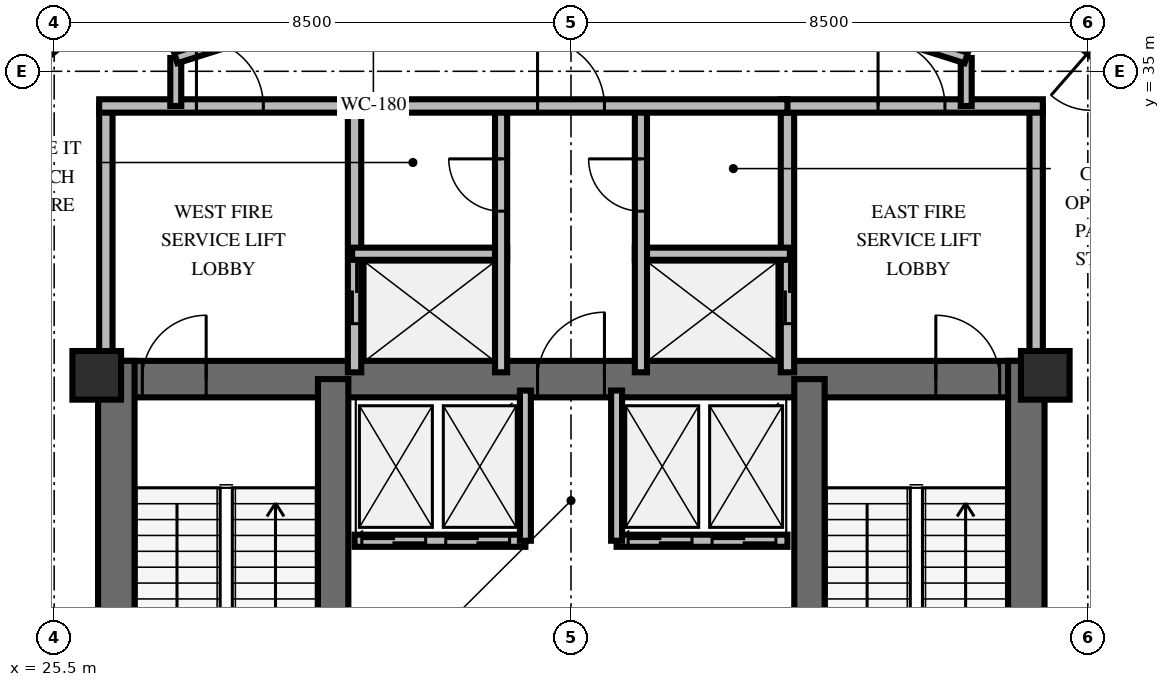
"""IFC4 building model, lengths in metres.
Left out: names, types, materials, properties, quantities, classifications, styles, units other than length and angle.
Written with IfcOpenShell. Run it as: python <this file> out.ifc"""

import sys

from ifc_helpers import new_model, si_unit, direction, frame, frame_2d, origin, origin_2d, place, context, subcontext, project, spatial, rectangle, extrude, element, fill, save


model = new_model("IFC4")
c1 = context("Model", 3, precision=1e-05, world=origin(), true_north=direction((0.0, 1.0)))
c2 = subcontext(c1, "Body", "Model", "MODEL_VIEW")
j1 = project(units=[si_unit("LENGTHUNIT", "METRE"), si_unit("PLANEANGLEUNIT", "RADIAN")], contexts=[c1])
p1 = place(None, origin())
s1 = spatial("IfcSite", under=j1, at=p1, CompositionType="ELEMENT")
p2 = place(p1, origin())
s2 = spatial("IfcBuilding", under=s1, at=p2, CompositionType="ELEMENT")
p3 = place(p2, frame((0.0, 0.0, 273.6)))
s3 = spatial("IfcBuildingStorey", under=s2, at=p3, CompositionType="ELEMENT", Elevation=273.6)
p4 = place(p3, frame((26.222, 29.938, 0.0), z_axis=(0.0, 0.0, 1.0), x_axis=(1.0, 0.0, 0.0)))
e1 = element("IfcWall", 1, at=p4, inside=s3, PredefinedType="SHEAR", context=c2, shape_type="SweptSolid", body=[
    extrude(rectangle(XDim=15.566, YDim=0.6, at=frame_2d((7.783, 0.0))), origin(), (0.0, 0.0, 1.0), 3.6),
])
p5 = place(p4, frame((0.728, 0.0, 0.0)))
e2 = element("IfcOpeningElement", 2, at=p5, cuts=e1, PredefinedType="OPENING", context=c2, shape_type="SweptSolid", body=[
    extrude(rectangle(XDim=1.05, YDim=2.15, at=frame_2d((0.525, 1.075))), frame((0.0, 0.31, 0.0), z_axis=(0.0, -1.0, 0.0), x_axis=(1.0, 0.0, 0.0)), (0.0, 0.0, 1.0), 0.62),
])
p6 = place(p4, frame((13.778, 0.0, 0.0)))
e3 = element("IfcOpeningElement", 3, at=p6, cuts=e1, PredefinedType="OPENING", context=c2, shape_type="SweptSolid", body=[
    extrude(rectangle(XDim=1.05, YDim=2.15, at=frame_2d((0.525, 1.075))), frame((0.0, 0.31, 0.0), z_axis=(0.0, -1.0, 0.0), x_axis=(1.0, 0.0, 0.0)), (0.0, 0.0, 1.0), 0.62),
])
p7 = place(p4, frame((7.228, 0.0, 0.0)))
e4 = element("IfcOpeningElement", 4, at=p7, cuts=e1, PredefinedType="OPENING", context=c2, shape_type="SweptSolid", body=[
    extrude(rectangle(XDim=1.1, YDim=2.15, at=frame_2d((0.55, 1.075))), frame((0.0, 0.31, 0.0), z_axis=(0.0, -1.0, 0.0), x_axis=(1.0, 0.0, 0.0)), (0.0, 0.0, 1.0), 0.62),
])
for number, where, z_axis, x_axis in (
    (5, (26.522, 19.962, 0.0), (0.0, 0.0, 1.0), (0.0, 1.0, 0.0)),
    (6, (41.488, 19.962, 0.0), (0.0, 0.0, 1.0), (0.0, 1.0, 0.0)),
):
    element("IfcWall", number, at=place(p3, frame(where, z_axis=z_axis, x_axis=x_axis)), inside=s3, PredefinedType="SHEAR", context=c2, shape_type="SweptSolid", body=[
        extrude(rectangle(XDim=10.276, YDim=0.6, at=frame_2d((5.138, 0.0))), origin(), (0.0, 0.0, 1.0), 3.6),
    ])
for number, where, z_axis, x_axis in (
    (7, (30.088, 20.262, 0.0), (0.0, 0.0, 1.0), (0.0, 1.0, 0.0)),
    (8, (37.922, 20.262, 0.0), (0.0, 0.0, 1.0), (0.0, 1.0, 0.0)),
):
    element("IfcWall", number, at=place(p3, frame(where, z_axis=z_axis, x_axis=x_axis)), inside=s3, PredefinedType="SHEAR", context=c2, shape_type="SweptSolid", body=[
        extrude(rectangle(XDim=9.676, YDim=0.5, at=frame_2d((4.838, 0.0))), origin(), (0.0, 0.0, 1.0), 3.6),
    ])
for number, where, z_axis, x_axis in (
    (9, (26.2, 30.0, 0.0), (0.0, 0.0, 1.0), (1.0, 0.0, 0.0)),
    (10, (41.8, 30.0, 0.0), (0.0, 0.0, 1.0), (1.0, 0.0, 0.0)),
):
    element("IfcColumn", number, at=place(p3, frame(where, z_axis=z_axis, x_axis=x_axis)), inside=s3, PredefinedType="PILASTER", context=c2, shape_type="SweptSolid", body=[
        extrude(rectangle(XDim=0.8, YDim=0.8, at=origin_2d()), origin(), (0.0, 0.0, 1.0), 3.6),
    ])
p8 = place(p3, frame((26.35, 30.05, 0.0), z_axis=(0.0, 0.0, 1.0), x_axis=(0.0, 1.0, 0.0)))
e11 = element("IfcWall", 11, at=p8, inside=s3, PredefinedType="SOLIDWALL", context=c2, shape_type="SweptSolid", body=[
    extrude(rectangle(XDim=4.38, YDim=0.22, at=frame_2d((2.19, 0.0))), origin(), (0.0, 0.0, 1.0), 2.46),
])
p9 = place(p3, frame((30.44, 30.05, 0.0), z_axis=(0.0, 0.0, 1.0), x_axis=(0.0, 1.0, 0.0)))
e12 = element("IfcWall", 12, at=p9, inside=s3, PredefinedType="SOLIDWALL", context=c2, shape_type="SweptSolid", body=[
    extrude(rectangle(XDim=4.38, YDim=0.22, at=frame_2d((2.19, 0.0))), origin(), (0.0, 0.0, 1.0), 2.46),
])
p10 = place(p9, frame((0.8, 0.0, 0.0)))
e13 = element("IfcOpeningElement", 13, at=p10, cuts=e12, PredefinedType="OPENING", context=c2, shape_type="SweptSolid", body=[
    extrude(rectangle(XDim=1.05, YDim=2.1, at=frame_2d((0.525, 1.05))), frame((0.0, 0.12, 0.0), z_axis=(0.0, -1.0, 0.0), x_axis=(1.0, 0.0, 0.0)), (0.0, 0.0, 1.0), 0.24),
])
p11 = place(p3, frame((26.24, 34.43, 0.0), z_axis=(0.0, 0.0, 1.0), x_axis=(1.0, 0.0, 0.0)))
e14 = element("IfcWall", 14, at=p11, inside=s3, PredefinedType="SOLIDWALL", context=c2, shape_type="SweptSolid", body=[
    extrude(rectangle(XDim=4.31, YDim=0.22, at=frame_2d((2.155, 0.0))), origin(), (0.0, 0.0, 1.0), 2.46),
])
p12 = place(p11, frame((1.6, 0.0, 0.0)))
e15 = element("IfcOpeningElement", 15, at=p12, cuts=e14, PredefinedType="OPENING", context=c2, shape_type="SweptSolid", body=[
    extrude(rectangle(XDim=1.1, YDim=2.15, at=frame_2d((0.55, 1.075))), frame((0.0, 0.12, 0.0), z_axis=(0.0, -1.0, 0.0), x_axis=(1.0, 0.0, 0.0)), (0.0, 0.0, 1.0), 0.24),
])
p13 = place(p3, frame((30.4, 32.0, 0.0), z_axis=(0.0, 0.0, 1.0), x_axis=(1.0, 0.0, 0.0)))
e16 = element("IfcWall", 16, at=p13, inside=s3, PredefinedType="SOLIDWALL", context=c2, shape_type="SweptSolid", body=[
    extrude(rectangle(XDim=2.55, YDim=0.2, at=frame_2d((1.275, 0.0))), origin(), (0.0, 0.0, 1.0), 2.46),
])
p14 = place(p3, frame((32.85, 30.05, 0.0), z_axis=(0.0, 0.0, 1.0), x_axis=(0.0, 1.0, 0.0)))
e17 = element("IfcWall", 17, at=p14, inside=s3, PredefinedType="SOLIDWALL", context=c2, shape_type="SweptSolid", body=[
    extrude(rectangle(XDim=4.38, YDim=0.2, at=frame_2d((2.19, 0.0))), origin(), (0.0, 0.0, 1.0), 2.46),
])
p15 = place(p14, frame((2.65, 0.0, 0.0)))
e18 = element("IfcOpeningElement", 18, at=p15, cuts=e17, PredefinedType="OPENING", context=c2, shape_type="SweptSolid", body=[
    extrude(rectangle(XDim=0.86, YDim=2.05, at=frame_2d((0.43, 1.025))), frame((0.0, 0.11, 0.0), z_axis=(0.0, -1.0, 0.0), x_axis=(1.0, 0.0, 0.0)), (0.0, 0.0, 1.0), 0.22),
])
p16 = place(p3, frame((37.56, 30.05, 0.0), z_axis=(0.0, 0.0, 1.0), x_axis=(0.0, 1.0, 0.0)))
e19 = element("IfcWall", 19, at=p16, inside=s3, PredefinedType="SOLIDWALL", context=c2, shape_type="SweptSolid", body=[
    extrude(rectangle(XDim=4.38, YDim=0.22, at=frame_2d((2.19, 0.0))), origin(), (0.0, 0.0, 1.0), 2.46),
])
p17 = place(p16, frame((0.8, 0.0, 0.0)))
e20 = element("IfcOpeningElement", 20, at=p17, cuts=e19, PredefinedType="OPENING", context=c2, shape_type="SweptSolid", body=[
    extrude(rectangle(XDim=1.05, YDim=2.1, at=frame_2d((0.525, 1.05))), frame((0.0, 0.12, 0.0), z_axis=(0.0, -1.0, 0.0), x_axis=(1.0, 0.0, 0.0)), (0.0, 0.0, 1.0), 0.24),
])
p18 = place(p3, frame((41.65, 30.05, 0.0), z_axis=(0.0, 0.0, 1.0), x_axis=(0.0, 1.0, 0.0)))
e21 = element("IfcWall", 21, at=p18, inside=s3, PredefinedType="SOLIDWALL", context=c2, shape_type="SweptSolid", body=[
    extrude(rectangle(XDim=4.38, YDim=0.22, at=frame_2d((2.19, 0.0))), origin(), (0.0, 0.0, 1.0), 2.46),
])
p19 = place(p3, frame((37.45, 34.43, 0.0), z_axis=(0.0, 0.0, 1.0), x_axis=(1.0, 0.0, 0.0)))
e22 = element("IfcWall", 22, at=p19, inside=s3, PredefinedType="SOLIDWALL", context=c2, shape_type="SweptSolid", body=[
    extrude(rectangle(XDim=4.31, YDim=0.22, at=frame_2d((2.155, 0.0))), origin(), (0.0, 0.0, 1.0), 2.46),
])
p20 = place(p19, frame((1.6, 0.0, 0.0)))
e23 = element("IfcOpeningElement", 23, at=p20, cuts=e22, PredefinedType="OPENING", context=c2, shape_type="SweptSolid", body=[
    extrude(rectangle(XDim=1.1, YDim=2.15, at=frame_2d((0.55, 1.075))), frame((0.0, 0.12, 0.0), z_axis=(0.0, -1.0, 0.0), x_axis=(1.0, 0.0, 0.0)), (0.0, 0.0, 1.0), 0.24),
])
p21 = place(p3, frame((35.05, 32.0, 0.0), z_axis=(0.0, 0.0, 1.0), x_axis=(1.0, 0.0, 0.0)))
e24 = element("IfcWall", 24, at=p21, inside=s3, PredefinedType="SOLIDWALL", context=c2, shape_type="SweptSolid", body=[
    extrude(rectangle(XDim=2.55, YDim=0.2, at=frame_2d((1.275, 0.0))), origin(), (0.0, 0.0, 1.0), 2.46),
])
p22 = place(p3, frame((35.15, 30.05, 0.0), z_axis=(0.0, 0.0, 1.0), x_axis=(0.0, 1.0, 0.0)))
e25 = element("IfcWall", 25, at=p22, inside=s3, PredefinedType="SOLIDWALL", context=c2, shape_type="SweptSolid", body=[
    extrude(rectangle(XDim=4.38, YDim=0.2, at=frame_2d((2.19, 0.0))), origin(), (0.0, 0.0, 1.0), 2.46),
])
p23 = place(p22, frame((2.65, 0.0, 0.0)))
e26 = element("IfcOpeningElement", 26, at=p23, cuts=e25, PredefinedType="OPENING", context=c2, shape_type="SweptSolid", body=[
    extrude(rectangle(XDim=0.86, YDim=2.05, at=frame_2d((0.43, 1.025))), frame((0.0, 0.11, 0.0), z_axis=(0.0, -1.0, 0.0), x_axis=(1.0, 0.0, 0.0)), (0.0, 0.0, 1.0), 0.22),
])
p24 = place(p3, frame((30.44, 34.43, 0.0), z_axis=(0.0, 0.0, 1.0), x_axis=(1.0, 0.0, 0.0)))
e27 = element("IfcWall", 27, at=p24, inside=s3, PredefinedType="SOLIDWALL", context=c2, shape_type="SweptSolid", body=[
    extrude(rectangle(XDim=7.12, YDim=0.22, at=frame_2d((3.56, 0.0))), origin(), (0.0, 0.0, 1.0), 2.46),
])
p25 = place(p24, frame((3.01, 0.0, 0.0)))
e28 = element("IfcOpeningElement", 28, at=p25, cuts=e27, PredefinedType="OPENING", context=c2, shape_type="SweptSolid", body=[
    extrude(rectangle(XDim=1.1, YDim=2.15, at=frame_2d((0.55, 1.075))), frame((0.0, 0.12, 0.0), z_axis=(0.0, -1.0, 0.0), x_axis=(1.0, 0.0, 0.0)), (0.0, 0.0, 1.0), 0.24),
])
p26 = place(p3, frame((30.44, 27.28, 0.0), z_axis=(0.0, 0.0, 1.0), x_axis=(1.0, 0.0, 0.0)))
e29 = element("IfcWall", 29, at=p26, inside=s3, PredefinedType="SOLIDWALL", context=c2, shape_type="SweptSolid", body=[
    extrude(rectangle(XDim=2.81, YDim=0.2, at=frame_2d((1.405, 0.0))), origin(), (0.0, 0.0, 1.0), 2.46),
])
p27 = place(p26, frame((0.12, 0.0, 0.0)))
e30 = element("IfcOpeningElement", 30, at=p27, cuts=e29, PredefinedType="OPENING", context=c2, shape_type="SweptSolid", body=[
    extrude(rectangle(XDim=1.05, YDim=2.1, at=frame_2d((0.525, 1.05))), frame((0.0, 0.11, 0.0), z_axis=(0.0, -1.0, 0.0), x_axis=(1.0, 0.0, 0.0)), (0.0, 0.0, 1.0), 0.22),
])
p28 = place(p26, frame((1.5, 0.0, 0.0)))
e31 = element("IfcOpeningElement", 31, at=p28, cuts=e29, PredefinedType="OPENING", context=c2, shape_type="SweptSolid", body=[
    extrude(rectangle(XDim=1.05, YDim=2.1, at=frame_2d((0.525, 1.05))), frame((0.0, 0.11, 0.0), z_axis=(0.0, -1.0, 0.0), x_axis=(1.0, 0.0, 0.0)), (0.0, 0.0, 1.0), 0.22),
])
p29 = place(p3, frame((33.25, 27.28, 0.0), z_axis=(0.0, 0.0, 1.0), x_axis=(0.0, 1.0, 0.0)))
e32 = element("IfcWall", 32, at=p29, inside=s3, PredefinedType="SOLIDWALL", context=c2, shape_type="SweptSolid", body=[
    extrude(rectangle(XDim=2.47, YDim=0.18, at=frame_2d((1.235, 0.0))), origin(), (0.0, 0.0, 1.0), 2.46),
])
p30 = place(p3, frame((34.75, 27.28, 0.0), z_axis=(0.0, 0.0, 1.0), x_axis=(1.0, 0.0, 0.0)))
e33 = element("IfcWall", 33, at=p30, inside=s3, PredefinedType="SOLIDWALL", context=c2, shape_type="SweptSolid", body=[
    extrude(rectangle(XDim=2.81, YDim=0.2, at=frame_2d((1.405, 0.0))), origin(), (0.0, 0.0, 1.0), 2.46),
])
p31 = place(p30, frame((0.19, 0.0, 0.0)))
e34 = element("IfcOpeningElement", 34, at=p31, cuts=e33, PredefinedType="OPENING", context=c2, shape_type="SweptSolid", body=[
    extrude(rectangle(XDim=1.05, YDim=2.1, at=frame_2d((0.525, 1.05))), frame((0.0, 0.11, 0.0), z_axis=(0.0, -1.0, 0.0), x_axis=(1.0, 0.0, 0.0)), (0.0, 0.0, 1.0), 0.22),
])
p32 = place(p30, frame((1.57, 0.0, 0.0)))
e35 = element("IfcOpeningElement", 35, at=p32, cuts=e33, PredefinedType="OPENING", context=c2, shape_type="SweptSolid", body=[
    extrude(rectangle(XDim=1.05, YDim=2.1, at=frame_2d((0.525, 1.05))), frame((0.0, 0.11, 0.0), z_axis=(0.0, -1.0, 0.0), x_axis=(1.0, 0.0, 0.0)), (0.0, 0.0, 1.0), 0.22),
])
p33 = place(p3, frame((34.75, 27.28, 0.0), z_axis=(0.0, 0.0, 1.0), x_axis=(0.0, 1.0, 0.0)))
e36 = element("IfcWall", 36, at=p33, inside=s3, PredefinedType="SOLIDWALL", context=c2, shape_type="SweptSolid", body=[
    extrude(rectangle(XDim=2.47, YDim=0.18, at=frame_2d((1.235, 0.0))), origin(), (0.0, 0.0, 1.0), 2.46),
])
for number, where, z_axis, x_axis in (
    (37, (27.5, 34.43, 0.0), (0.0, 0.0, 1.0), (0.0, 1.0, 0.0)),
    (38, (40.5, 35.219, 0.0), (0.0, 0.0, 1.0), (0.0, -1.0, 0.0)),
):
    element("IfcWall", number, at=place(p3, frame(where, z_axis=z_axis, x_axis=x_axis)), inside=s3, PredefinedType="PARTITIONING", context=c2, shape_type="SweptSolid", body=[
        extrude(rectangle(XDim=0.789, YDim=0.18, at=frame_2d((0.395, 0.0))), origin(), (0.0, 0.0, 1.0), 2.46),
    ])
p34 = place(p3, frame((27.5, 35.219, 0.0), z_axis=(0.0, 0.0, 1.0), x_axis=(0.953228121756, 0.302251795518, 0.0)))
e39 = element("IfcWall", 39, at=p34, inside=s3, PredefinedType="PARTITIONING", context=c2, shape_type="SweptSolid", body=[
    extrude(rectangle(XDim=6.819, YDim=0.18, at=frame_2d((3.409, 0.0))), origin(), (0.0, 0.0, 1.0), 2.46),
])
p35 = place(p34, frame((2.86, 0.0, 0.0)))
e40 = element("IfcOpeningElement", 40, at=p35, cuts=e39, PredefinedType="OPENING", context=c2, shape_type="SweptSolid", body=[
    extrude(rectangle(XDim=1.1, YDim=2.15, at=frame_2d((0.55, 1.075))), frame((0.0, 0.1, 0.0), z_axis=(0.0, -1.0, 0.0), x_axis=(1.0, 0.0, 0.0)), (0.0, 0.0, 1.0), 0.2),
])
p36 = place(p3, frame((34.0, 37.28, 0.0), z_axis=(0.0, 0.0, 1.0), x_axis=(0.953228121756, -0.302251795518, 0.0)))
e41 = element("IfcWall", 41, at=p36, inside=s3, PredefinedType="PARTITIONING", context=c2, shape_type="SweptSolid", body=[
    extrude(rectangle(XDim=6.819, YDim=0.18, at=frame_2d((3.409, 0.0))), origin(), (0.0, 0.0, 1.0), 2.46),
])
p37 = place(p36, frame((2.86, 0.0, 0.0)))
e42 = element("IfcOpeningElement", 42, at=p37, cuts=e41, PredefinedType="OPENING", context=c2, shape_type="SweptSolid", body=[
    extrude(rectangle(XDim=1.1, YDim=2.15, at=frame_2d((0.55, 1.075))), frame((0.0, 0.1, 0.0), z_axis=(0.0, -1.0, 0.0), x_axis=(1.0, 0.0, 0.0)), (0.0, 0.0, 1.0), 0.2),
])
p38 = place(p3, frame((44.016, 34.082, 0.0), z_axis=(0.0, 0.0, 1.0), x_axis=(-0.753560422162, 0.657378650514, 0.0)))
e43 = element("IfcWall", 43, at=p38, inside=s3, PredefinedType="PARTITIONING", context=c2, shape_type="SweptSolid", body=[
    extrude(rectangle(XDim=4.47, YDim=0.18, at=frame_2d((2.235, 0.0))), origin(), (0.0, 0.0, 1.0), 2.46),
])
p39 = place(p38, frame((0.942, 0.0, 0.0)))
e44 = element("IfcOpeningElement", 44, at=p39, cuts=e43, PredefinedType="OPENING", context=c2, shape_type="SweptSolid", body=[
    extrude(rectangle(XDim=1.0, YDim=2.15, at=frame_2d((0.5, 1.075))), frame((0.0, 0.1, 0.0), z_axis=(0.0, -1.0, 0.0), x_axis=(1.0, 0.0, 0.0)), (0.0, 0.0, 1.0), 0.2),
])
p40 = place(p3, frame((45.456, 35.244, 0.0), z_axis=(0.0, 0.0, 1.0), x_axis=(-0.753561003445, 0.657377984182, 0.0)))
e45 = element("IfcWall", 45, at=p40, inside=s3, PredefinedType="PARTITIONING", context=c2, shape_type="SweptSolid", body=[
    extrude(rectangle(XDim=5.112, YDim=0.16, at=frame_2d((2.556, 0.0))), origin(), (0.0, 0.0, 1.0), 2.46),
])
p41 = place(p40, frame((1.131, 0.0, 0.0)))
e46 = element("IfcOpeningElement", 46, at=p41, cuts=e45, PredefinedType="OPENING", context=c2, shape_type="SweptSolid", body=[
    extrude(rectangle(XDim=0.95, YDim=2.15, at=frame_2d((0.475, 1.075))), frame((0.0, 0.09, 0.0), z_axis=(0.0, -1.0, 0.0), x_axis=(1.0, 0.0, 0.0)), (0.0, 0.0, 1.0), 0.18),
])
p42 = place(p3, frame((27.78, 37.267, 0.0), z_axis=(0.0, 0.0, 1.0), x_axis=(-0.778283015722, -0.627913646483, 0.0)))
e47 = element("IfcWall", 47, at=p42, inside=s3, PredefinedType="PARTITIONING", context=c2, shape_type="SweptSolid", body=[
    extrude(rectangle(XDim=4.47, YDim=0.18, at=frame_2d((2.235, 0.0))), origin(), (0.0, 0.0, 1.0), 2.46),
])
p43 = place(p5, origin())
e48 = element("IfcDoor", 48, at=p43, inside=s3, OperationType="SINGLE_SWING_RIGHT", PredefinedType="DOOR", context=c2, shape_type="SweptSolid", body=[
    extrude(rectangle(XDim=1.05, YDim=2.15, at=frame_2d((0.525, 1.075))), frame((0.0, 0.025, 0.0), z_axis=(0.0, -1.0, 0.0), x_axis=(1.0, 0.0, 0.0)), (0.0, 0.0, 1.0), 0.05),
])
fill(e2, e48)
p44 = place(p6, origin())
e49 = element("IfcDoor", 49, at=p44, inside=s3, OperationType="SINGLE_SWING_LEFT", PredefinedType="DOOR", context=c2, shape_type="SweptSolid", body=[
    extrude(rectangle(XDim=1.05, YDim=2.15, at=frame_2d((0.525, 1.075))), frame((0.0, 0.025, 0.0), z_axis=(0.0, -1.0, 0.0), x_axis=(1.0, 0.0, 0.0)), (0.0, 0.0, 1.0), 0.05),
])
fill(e3, e49)
p45 = place(p7, origin())
e50 = element("IfcDoor", 50, at=p45, inside=s3, OperationType="SINGLE_SWING_RIGHT", PredefinedType="DOOR", context=c2, shape_type="SweptSolid", body=[
    extrude(rectangle(XDim=1.1, YDim=2.15, at=frame_2d((0.55, 1.075))), frame((0.0, 0.025, 0.0), z_axis=(0.0, -1.0, 0.0), x_axis=(1.0, 0.0, 0.0)), (0.0, 0.0, 1.0), 0.05),
])
fill(e4, e50)
p46 = place(p12, origin())
e51 = element("IfcDoor", 51, at=p46, inside=s3, OperationType="SINGLE_SWING_LEFT", PredefinedType="DOOR", context=c2, shape_type="SweptSolid", body=[
    extrude(rectangle(XDim=1.1, YDim=2.15, at=frame_2d((0.55, 1.075))), frame((0.0, 0.025, 0.0), z_axis=(0.0, -1.0, 0.0), x_axis=(1.0, 0.0, 0.0)), (0.0, 0.0, 1.0), 0.05),
])
fill(e15, e51)
p47 = place(p10, origin())
e52 = element("IfcDoor", 52, at=p47, inside=s3, OperationType="DOUBLE_DOOR_SLIDING", PredefinedType="USERDEFINED", context=c2, shape_type="SweptSolid", body=[
    extrude(rectangle(XDim=1.05, YDim=2.1, at=frame_2d((0.525, 1.05))), frame((0.0, 0.025, 0.0), z_axis=(0.0, -1.0, 0.0), x_axis=(1.0, 0.0, 0.0)), (0.0, 0.0, 1.0), 0.05),
])
fill(e13, e52)
p48 = place(p15, origin())
e53 = element("IfcDoor", 53, at=p48, inside=s3, OperationType="SINGLE_SWING_RIGHT", PredefinedType="TRAPDOOR", context=c2, shape_type="SweptSolid", body=[
    extrude(rectangle(XDim=0.86, YDim=2.05, at=frame_2d((0.43, 1.025))), frame((0.0, 0.025, 0.0), z_axis=(0.0, -1.0, 0.0), x_axis=(1.0, 0.0, 0.0)), (0.0, 0.0, 1.0), 0.05),
])
fill(e18, e53)
p49 = place(p20, origin())
e54 = element("IfcDoor", 54, at=p49, inside=s3, OperationType="SINGLE_SWING_LEFT", PredefinedType="DOOR", context=c2, shape_type="SweptSolid", body=[
    extrude(rectangle(XDim=1.1, YDim=2.15, at=frame_2d((0.55, 1.075))), frame((0.0, 0.025, 0.0), z_axis=(0.0, -1.0, 0.0), x_axis=(1.0, 0.0, 0.0)), (0.0, 0.0, 1.0), 0.05),
])
fill(e23, e54)
p50 = place(p17, origin())
e55 = element("IfcDoor", 55, at=p50, inside=s3, OperationType="DOUBLE_DOOR_SLIDING", PredefinedType="USERDEFINED", context=c2, shape_type="SweptSolid", body=[
    extrude(rectangle(XDim=1.05, YDim=2.1, at=frame_2d((0.525, 1.05))), frame((0.0, 0.025, 0.0), z_axis=(0.0, -1.0, 0.0), x_axis=(1.0, 0.0, 0.0)), (0.0, 0.0, 1.0), 0.05),
])
fill(e20, e55)
p51 = place(p23, origin())
e56 = element("IfcDoor", 56, at=p51, inside=s3, OperationType="SINGLE_SWING_RIGHT", PredefinedType="TRAPDOOR", context=c2, shape_type="SweptSolid", body=[
    extrude(rectangle(XDim=0.86, YDim=2.05, at=frame_2d((0.43, 1.025))), frame((0.0, 0.025, 0.0), z_axis=(0.0, -1.0, 0.0), x_axis=(1.0, 0.0, 0.0)), (0.0, 0.0, 1.0), 0.05),
])
fill(e26, e56)
p52 = place(p25, origin())
e57 = element("IfcDoor", 57, at=p52, inside=s3, OperationType="SINGLE_SWING_LEFT", PredefinedType="DOOR", context=c2, shape_type="SweptSolid", body=[
    extrude(rectangle(XDim=1.1, YDim=2.15, at=frame_2d((0.55, 1.075))), frame((0.0, 0.025, 0.0), z_axis=(0.0, -1.0, 0.0), x_axis=(1.0, 0.0, 0.0)), (0.0, 0.0, 1.0), 0.05),
])
fill(e28, e57)
p53 = place(p27, origin())
e58 = element("IfcDoor", 58, at=p53, inside=s3, OperationType="DOUBLE_DOOR_SLIDING", PredefinedType="USERDEFINED", context=c2, shape_type="SweptSolid", body=[
    extrude(rectangle(XDim=1.05, YDim=2.1, at=frame_2d((0.525, 1.05))), frame((0.0, 0.025, 0.0), z_axis=(0.0, -1.0, 0.0), x_axis=(1.0, 0.0, 0.0)), (0.0, 0.0, 1.0), 0.05),
])
fill(e30, e58)
p54 = place(p28, origin())
e59 = element("IfcDoor", 59, at=p54, inside=s3, OperationType="DOUBLE_DOOR_SLIDING", PredefinedType="USERDEFINED", context=c2, shape_type="SweptSolid", body=[
    extrude(rectangle(XDim=1.05, YDim=2.1, at=frame_2d((0.525, 1.05))), frame((0.0, 0.025, 0.0), z_axis=(0.0, -1.0, 0.0), x_axis=(1.0, 0.0, 0.0)), (0.0, 0.0, 1.0), 0.05),
])
fill(e31, e59)
p55 = place(p31, origin())
e60 = element("IfcDoor", 60, at=p55, inside=s3, OperationType="DOUBLE_DOOR_SLIDING", PredefinedType="USERDEFINED", context=c2, shape_type="SweptSolid", body=[
    extrude(rectangle(XDim=1.05, YDim=2.1, at=frame_2d((0.525, 1.05))), frame((0.0, 0.025, 0.0), z_axis=(0.0, -1.0, 0.0), x_axis=(1.0, 0.0, 0.0)), (0.0, 0.0, 1.0), 0.05),
])
fill(e34, e60)
p56 = place(p32, origin())
e61 = element("IfcDoor", 61, at=p56, inside=s3, OperationType="DOUBLE_DOOR_SLIDING", PredefinedType="USERDEFINED", context=c2, shape_type="SweptSolid", body=[
    extrude(rectangle(XDim=1.05, YDim=2.1, at=frame_2d((0.525, 1.05))), frame((0.0, 0.025, 0.0), z_axis=(0.0, -1.0, 0.0), x_axis=(1.0, 0.0, 0.0)), (0.0, 0.0, 1.0), 0.05),
])
fill(e35, e61)
p57 = place(p39, origin())
e62 = element("IfcDoor", 62, at=p57, inside=s3, OperationType="SINGLE_SWING_RIGHT", PredefinedType="DOOR", context=c2, shape_type="SweptSolid", body=[
    extrude(rectangle(XDim=1.0, YDim=2.15, at=frame_2d((0.5, 1.075))), frame((0.0, 0.025, 0.0), z_axis=(0.0, -1.0, 0.0), x_axis=(1.0, 0.0, 0.0)), (0.0, 0.0, 1.0), 0.05),
])
fill(e44, e62)
save(model, sys.argv[1])
